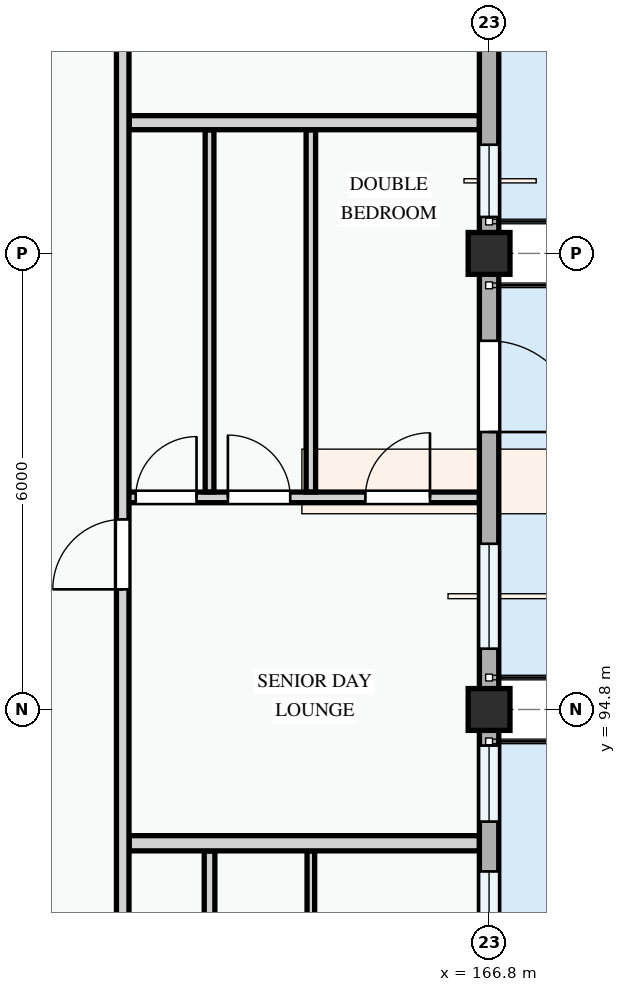
"""IFC4 building model, lengths in metres.
Left out: names, types, materials, properties, quantities, classifications, styles, units other than length and angle.
Written with IfcOpenShell. Run it as: python <this file> out.ifc"""

import sys

from ifc_helpers import new_model, si_unit, direction, frame, frame_2d, origin, origin_2d, place, context, subcontext, project, spatial, rectangle, extrude, element, fill, save


model = new_model("IFC4")
c1 = context("Model", 3, precision=1e-05, world=origin(), true_north=direction((0.0, 1.0)))
c2 = subcontext(c1, "Body", "Model", "MODEL_VIEW")
j1 = project(units=[si_unit("LENGTHUNIT", "METRE"), si_unit("PLANEANGLEUNIT", "RADIAN")], contexts=[c1])
p1 = place(None, origin())
s1 = spatial("IfcSite", under=j1, at=p1, CompositionType="ELEMENT")
p2 = place(p1, origin())
s2 = spatial("IfcBuilding", under=s1, at=p2, CompositionType="ELEMENT")
p3 = place(p2, frame((0.0, 0.0, 34.5)))
s3 = spatial("IfcBuildingStorey", under=s2, at=p3, CompositionType="ELEMENT", Elevation=34.5)
for number, where, z_axis, x_axis in (
    (1, (166.8, 94.8, 0.0), (0.0, 0.0, 1.0), (1.0, 0.0, 0.0)),
    (2, (166.8, 100.8, 0.0), (0.0, 0.0, 1.0), (1.0, 0.0, 0.0)),
):
    element("IfcColumn", number, at=place(p3, frame(where, z_axis=z_axis, x_axis=x_axis)), inside=s3, PredefinedType="COLUMN", context=c2, shape_type="SweptSolid", body=[
        extrude(rectangle(XDim=0.55, YDim=0.55, at=origin_2d()), origin(), (0.0, 0.0, 1.0), 3.3),
    ])
p4 = place(p3, frame((166.8, 86.4, 0.0), z_axis=(0.0, 0.0, 1.0), x_axis=(0.0, 1.0, 0.0)))
e3 = element("IfcWall", 3, at=p4, inside=s3, PredefinedType="STANDARD", context=c2, shape_type="SweptSolid", body=[
    extrude(rectangle(XDim=8.4, YDim=0.255, at=frame_2d((4.2, 0.0))), origin(), (0.0, 0.0, 1.0), 2.345),
])
p5 = place(p4, frame((3.548, 0.0, 0.0)))
e4 = element("IfcOpeningElement", 4, at=p5, cuts=e3, PredefinedType="OPENING", context=c2, shape_type="SweptSolid", body=[
    extrude(rectangle(XDim=1.1, YDim=2.15, at=frame_2d((0.55, 1.075))), frame((0.0, 0.137, 0.0), z_axis=(0.0, -1.0, 0.0), x_axis=(1.0, 0.0, 0.0)), (0.0, 0.0, 1.0), 0.275),
])
p6 = place(p4, frame((1.179, 0.0, 0.78)))
e5 = element("IfcOpeningElement", 5, at=p6, cuts=e3, PredefinedType="OPENING", context=c2, shape_type="SweptSolid", body=[
    extrude(rectangle(XDim=1.05, YDim=1.2, at=frame_2d((0.525, 0.6))), frame((0.0, 0.137, 0.0), z_axis=(0.0, -1.0, 0.0), x_axis=(1.0, 0.0, 0.0)), (0.0, 0.0, 1.0), 0.275),
])
p7 = place(p4, frame((5.069, 0.0, 0.78)))
e6 = element("IfcOpeningElement", 6, at=p7, cuts=e3, PredefinedType="OPENING", context=c2, shape_type="SweptSolid", body=[
    extrude(rectangle(XDim=1.2, YDim=1.35, at=frame_2d((0.6, 0.675))), frame((0.0, 0.137, 0.0), z_axis=(0.0, -1.0, 0.0), x_axis=(1.0, 0.0, 0.0)), (0.0, 0.0, 1.0), 0.275),
])
p8 = place(p4, frame((6.925, 0.0, 0.78)))
e7 = element("IfcOpeningElement", 7, at=p8, cuts=e3, PredefinedType="OPENING", context=c2, shape_type="SweptSolid", body=[
    extrude(rectangle(XDim=1.0, YDim=1.25, at=frame_2d((0.5, 0.625))), frame((0.0, 0.137, 0.0), z_axis=(0.0, -1.0, 0.0), x_axis=(1.0, 0.0, 0.0)), (0.0, 0.0, 1.0), 0.275),
])
p9 = place(p3, frame((166.8, 94.8, 0.0), z_axis=(0.0, 0.0, 1.0), x_axis=(0.0, 1.0, 0.0)))
e8 = element("IfcWall", 8, at=p9, inside=s3, PredefinedType="STANDARD", context=c2, shape_type="SweptSolid", body=[
    extrude(rectangle(XDim=6.0, YDim=0.255, at=frame_2d((3.0, 0.0))), origin(), (0.0, 0.0, 1.0), 2.445),
])
p10 = place(p9, frame((3.65, 0.0, 0.0)))
e9 = element("IfcOpeningElement", 9, at=p10, cuts=e8, PredefinedType="OPENING", context=c2, shape_type="SweptSolid", body=[
    extrude(rectangle(XDim=1.2, YDim=2.15, at=frame_2d((0.6, 1.075))), frame((0.0, 0.137, 0.0), z_axis=(0.0, -1.0, 0.0), x_axis=(1.0, 0.0, 0.0)), (0.0, 0.0, 1.0), 0.275),
])
p11 = place(p9, frame((0.8, 0.0, 0.78)))
e10 = element("IfcOpeningElement", 10, at=p11, cuts=e8, PredefinedType="OPENING", context=c2, shape_type="SweptSolid", body=[
    extrude(rectangle(XDim=1.38, YDim=1.48, at=frame_2d((0.69, 0.74))), frame((0.0, 0.137, 0.0), z_axis=(0.0, -1.0, 0.0), x_axis=(1.0, 0.0, 0.0)), (0.0, 0.0, 1.0), 0.275),
])
p12 = place(p3, frame((166.8, 100.8, 0.0), z_axis=(0.0, 0.0, 1.0), x_axis=(0.0, 1.0, 0.0)))
e11 = element("IfcWall", 11, at=p12, inside=s3, PredefinedType="STANDARD", context=c2, shape_type="SweptSolid", body=[
    extrude(rectangle(XDim=8.4, YDim=0.255, at=frame_2d((4.2, 0.0))), origin(), (0.0, 0.0, 1.0), 2.345),
])
p13 = place(p12, frame((2.732, 0.0, 0.0)))
e12 = element("IfcOpeningElement", 12, at=p13, cuts=e11, PredefinedType="OPENING", context=c2, shape_type="SweptSolid", body=[
    extrude(rectangle(XDim=1.25, YDim=2.2, at=frame_2d((0.625, 1.1))), frame((0.0, 0.137, 0.0), z_axis=(0.0, -1.0, 0.0), x_axis=(1.0, 0.0, 0.0)), (0.0, 0.0, 1.0), 0.275),
])
p14 = place(p12, frame((0.48, 0.0, 0.78)))
e13 = element("IfcOpeningElement", 13, at=p14, cuts=e11, PredefinedType="OPENING", context=c2, shape_type="SweptSolid", body=[
    extrude(rectangle(XDim=0.95, YDim=1.15, at=frame_2d((0.475, 0.575))), frame((0.0, 0.137, 0.0), z_axis=(0.0, -1.0, 0.0), x_axis=(1.0, 0.0, 0.0)), (0.0, 0.0, 1.0), 0.275),
])
p15 = place(p12, frame((5.892, 0.0, 0.78)))
e14 = element("IfcOpeningElement", 14, at=p15, cuts=e11, PredefinedType="OPENING", context=c2, shape_type="SweptSolid", body=[
    extrude(rectangle(XDim=1.42, YDim=1.38, at=frame_2d((0.71, 0.69))), frame((0.0, 0.137, 0.0), z_axis=(0.0, -1.0, 0.0), x_axis=(1.0, 0.0, 0.0)), (0.0, 0.0, 1.0), 0.275),
])
p16 = place(p3, frame((164.455, 89.678, 0.0), z_axis=(0.0, 0.0, 1.0), x_axis=(0.0, 1.0, 0.0)))
e15 = element("IfcWall", 15, at=p16, inside=s3, PredefinedType="PARTITIONING", context=c2, shape_type="SweptSolid", body=[
    extrude(rectangle(XDim=3.26, YDim=0.1, at=frame_2d((1.63, 0.0))), origin(), (0.0, 0.0, 1.0), 3.0),
])
p17 = place(p3, frame((163.122, 89.678, 0.0), z_axis=(0.0, 0.0, 1.0), x_axis=(0.0, 1.0, 0.0)))
e16 = element("IfcWall", 16, at=p17, inside=s3, PredefinedType="PARTITIONING", context=c2, shape_type="SweptSolid", body=[
    extrude(rectangle(XDim=3.26, YDim=0.14, at=frame_2d((1.63, 0.0))), origin(), (0.0, 0.0, 1.0), 3.0),
])
p18 = place(p3, frame((161.98, 97.59, 0.0), z_axis=(0.0, 0.0, 1.0), x_axis=(1.0, 0.0, 0.0)))
e17 = element("IfcWall", 17, at=p18, inside=s3, PredefinedType="PARTITIONING", context=c2, shape_type="SweptSolid", body=[
    extrude(rectangle(XDim=4.69, YDim=0.14, at=frame_2d((2.345, 0.0))), origin(), (0.0, 0.0, 1.0), 3.0),
])
p19 = place(p18, frame((0.171, 0.0, 0.0)))
e18 = element("IfcOpeningElement", 18, at=p19, cuts=e17, PredefinedType="OPENING", context=c2, shape_type="SweptSolid", body=[
    extrude(rectangle(XDim=0.8, YDim=2.1, at=frame_2d((0.4, 1.05))), frame((0.0, 0.08, 0.0), z_axis=(0.0, -1.0, 0.0), x_axis=(1.0, 0.0, 0.0)), (0.0, 0.0, 1.0), 0.16),
])
p20 = place(p18, frame((1.384, 0.0, 0.0)))
e19 = element("IfcOpeningElement", 19, at=p20, cuts=e17, PredefinedType="OPENING", context=c2, shape_type="SweptSolid", body=[
    extrude(rectangle(XDim=0.82, YDim=2.08, at=frame_2d((0.41, 1.04))), frame((0.0, 0.08, 0.0), z_axis=(0.0, -1.0, 0.0), x_axis=(1.0, 0.0, 0.0)), (0.0, 0.0, 1.0), 0.16),
])
p21 = place(p18, frame((3.193, 0.0, 0.0)))
e20 = element("IfcOpeningElement", 20, at=p21, cuts=e17, PredefinedType="OPENING", context=c2, shape_type="SweptSolid", body=[
    extrude(rectangle(XDim=0.85, YDim=2.1, at=frame_2d((0.425, 1.05))), frame((0.0, 0.08, 0.0), z_axis=(0.0, -1.0, 0.0), x_axis=(1.0, 0.0, 0.0)), (0.0, 0.0, 1.0), 0.16),
])
p22 = place(p3, frame((164.455, 97.662, 0.0), z_axis=(0.0, 0.0, 1.0), x_axis=(0.0, 1.0, 0.0)))
e21 = element("IfcWall", 21, at=p22, inside=s3, PredefinedType="PARTITIONING", context=c2, shape_type="SweptSolid", body=[
    extrude(rectangle(XDim=4.763, YDim=0.125, at=frame_2d((2.382, 0.0))), origin(), (0.0, 0.0, 1.0), 3.0),
])
p23 = place(p3, frame((163.122, 97.662, 0.0), z_axis=(0.0, 0.0, 1.0), x_axis=(0.0, 1.0, 0.0)))
e22 = element("IfcWall", 22, at=p23, inside=s3, PredefinedType="PARTITIONING", context=c2, shape_type="SweptSolid", body=[
    extrude(rectangle(XDim=4.763, YDim=0.115, at=frame_2d((2.382, 0.0))), origin(), (0.0, 0.0, 1.0), 3.0),
])
p24 = place(p3, frame((162.064, 93.04, 0.0), z_axis=(0.0, 0.0, 1.0), x_axis=(1.0, 0.0, 0.0)))
e23 = element("IfcWall", 23, at=p24, inside=s3, PredefinedType="PARTITIONING", context=c2, shape_type="SweptSolid", body=[
    extrude(rectangle(XDim=4.606, YDim=0.2, at=frame_2d((2.303, 0.0))), origin(), (0.0, 0.0, 1.0), 3.0),
])
p25 = place(p3, frame((162.064, 102.52, 0.0), z_axis=(0.0, 0.0, 1.0), x_axis=(1.0, 0.0, 0.0)))
e24 = element("IfcWall", 24, at=p25, inside=s3, PredefinedType="PARTITIONING", context=c2, shape_type="SweptSolid", body=[
    extrude(rectangle(XDim=4.606, YDim=0.185, at=frame_2d((2.303, 0.0))), origin(), (0.0, 0.0, 1.0), 3.0),
])
p26 = place(p3, frame((161.98, 86.53, 0.0), z_axis=(0.0, 0.0, 1.0), x_axis=(0.0, 1.0, 0.0)))
e25 = element("IfcWall", 25, at=p26, inside=s3, PredefinedType="PARTITIONING", context=c2, shape_type="SweptSolid", body=[
    extrude(rectangle(XDim=22.811, YDim=0.165, at=frame_2d((11.405, 0.0))), origin(), (0.0, 0.0, 1.0), 3.0),
])
p27 = place(p26, frame((1.879, 0.0, 0.0)))
e26 = element("IfcOpeningElement", 26, at=p27, cuts=e25, PredefinedType="OPENING", context=c2, shape_type="SweptSolid", body=[
    extrude(rectangle(XDim=0.96, YDim=2.12, at=frame_2d((0.48, 1.06))), frame((0.0, 0.093, 0.0), z_axis=(0.0, -1.0, 0.0), x_axis=(1.0, 0.0, 0.0)), (0.0, 0.0, 1.0), 0.185),
])
p28 = place(p26, frame((9.851, 0.0, 0.0)))
e27 = element("IfcOpeningElement", 27, at=p28, cuts=e25, PredefinedType="OPENING", context=c2, shape_type="SweptSolid", body=[
    extrude(rectangle(XDim=0.92, YDim=2.1, at=frame_2d((0.46, 1.05))), frame((0.0, 0.093, 0.0), z_axis=(0.0, -1.0, 0.0), x_axis=(1.0, 0.0, 0.0)), (0.0, 0.0, 1.0), 0.185),
])
p29 = place(p26, frame((17.997, 0.0, 0.0)))
e28 = element("IfcOpeningElement", 28, at=p29, cuts=e25, PredefinedType="OPENING", context=c2, shape_type="SweptSolid", body=[
    extrude(rectangle(XDim=0.92, YDim=2.1, at=frame_2d((0.46, 1.05))), frame((0.0, 0.093, 0.0), z_axis=(0.0, -1.0, 0.0), x_axis=(1.0, 0.0, 0.0)), (0.0, 0.0, 1.0), 0.185),
])
p30 = place(p7, origin())
e29 = element("IfcWindow", 29, at=p30, inside=s3, PartitioningType="SINGLE_PANEL", PredefinedType="WINDOW", context=c2, shape_type="SweptSolid", body=[
    extrude(rectangle(XDim=1.2, YDim=1.35, at=frame_2d((0.6, 0.675))), frame((0.0, 0.03, 0.0), z_axis=(0.0, -1.0, 0.0), x_axis=(1.0, 0.0, 0.0)), (0.0, 0.0, 1.0), 0.06),
])
fill(e6, e29)
p31 = place(p8, origin())
e30 = element("IfcWindow", 30, at=p31, inside=s3, PartitioningType="SINGLE_PANEL", PredefinedType="WINDOW", context=c2, shape_type="SweptSolid", body=[
    extrude(rectangle(XDim=1.0, YDim=1.25, at=frame_2d((0.5, 0.625))), frame((0.0, 0.03, 0.0), z_axis=(0.0, -1.0, 0.0), x_axis=(1.0, 0.0, 0.0)), (0.0, 0.0, 1.0), 0.06),
])
fill(e7, e30)
p32 = place(p10, frame((1.2, 0.0, 0.0), z_axis=(0.0, 0.0, 1.0), x_axis=(-1.0, 0.0, 0.0)))
e31 = element("IfcDoor", 31, at=p32, inside=s3, OperationType="SINGLE_SWING_RIGHT", PredefinedType="DOOR", context=c2, shape_type="SweptSolid", body=[
    extrude(rectangle(XDim=1.2, YDim=2.15, at=frame_2d((0.6, 1.075))), frame((0.0, 0.025, 0.0), z_axis=(0.0, -1.0, 0.0), x_axis=(1.0, 0.0, 0.0)), (0.0, 0.0, 1.0), 0.05),
])
fill(e9, e31)
p33 = place(p11, origin())
e32 = element("IfcWindow", 32, at=p33, inside=s3, PartitioningType="SINGLE_PANEL", PredefinedType="WINDOW", context=c2, shape_type="SweptSolid", body=[
    extrude(rectangle(XDim=1.38, YDim=1.48, at=frame_2d((0.69, 0.74))), frame((0.0, 0.03, 0.0), z_axis=(0.0, -1.0, 0.0), x_axis=(1.0, 0.0, 0.0)), (0.0, 0.0, 1.0), 0.06),
])
fill(e10, e32)
p34 = place(p14, origin())
e33 = element("IfcWindow", 33, at=p34, inside=s3, PartitioningType="SINGLE_PANEL", PredefinedType="WINDOW", context=c2, shape_type="SweptSolid", body=[
    extrude(rectangle(XDim=0.95, YDim=1.15, at=frame_2d((0.475, 0.575))), frame((0.0, 0.03, 0.0), z_axis=(0.0, -1.0, 0.0), x_axis=(1.0, 0.0, 0.0)), (0.0, 0.0, 1.0), 0.06),
])
fill(e13, e33)
p35 = place(p19, origin())
e34 = element("IfcDoor", 34, at=p35, inside=s3, OperationType="SINGLE_SWING_RIGHT", PredefinedType="DOOR", context=c2, shape_type="SweptSolid", body=[
    extrude(rectangle(XDim=0.8, YDim=2.1, at=frame_2d((0.4, 1.05))), frame((0.0, 0.025, 0.0), z_axis=(0.0, -1.0, 0.0), x_axis=(1.0, 0.0, 0.0)), (0.0, 0.0, 1.0), 0.05),
])
fill(e18, e34)
p36 = place(p20, origin())
e35 = element("IfcDoor", 35, at=p36, inside=s3, OperationType="SINGLE_SWING_LEFT", PredefinedType="DOOR", context=c2, shape_type="SweptSolid", body=[
    extrude(rectangle(XDim=0.82, YDim=2.08, at=frame_2d((0.41, 1.04))), frame((0.0, 0.025, 0.0), z_axis=(0.0, -1.0, 0.0), x_axis=(1.0, 0.0, 0.0)), (0.0, 0.0, 1.0), 0.05),
])
fill(e19, e35)
p37 = place(p21, origin())
e36 = element("IfcDoor", 36, at=p37, inside=s3, OperationType="SINGLE_SWING_RIGHT", PredefinedType="DOOR", context=c2, shape_type="SweptSolid", body=[
    extrude(rectangle(XDim=0.85, YDim=2.1, at=frame_2d((0.425, 1.05))), frame((0.0, 0.025, 0.0), z_axis=(0.0, -1.0, 0.0), x_axis=(1.0, 0.0, 0.0)), (0.0, 0.0, 1.0), 0.05),
])
fill(e20, e36)
p38 = place(p28, origin())
e37 = element("IfcDoor", 37, at=p38, inside=s3, OperationType="SINGLE_SWING_LEFT", PredefinedType="DOOR", context=c2, shape_type="SweptSolid", body=[
    extrude(rectangle(XDim=0.92, YDim=2.1, at=frame_2d((0.46, 1.05))), frame((0.0, 0.025, 0.0), z_axis=(0.0, -1.0, 0.0), x_axis=(1.0, 0.0, 0.0)), (0.0, 0.0, 1.0), 0.05),
])
fill(e27, e37)
save(model, sys.argv[1])
